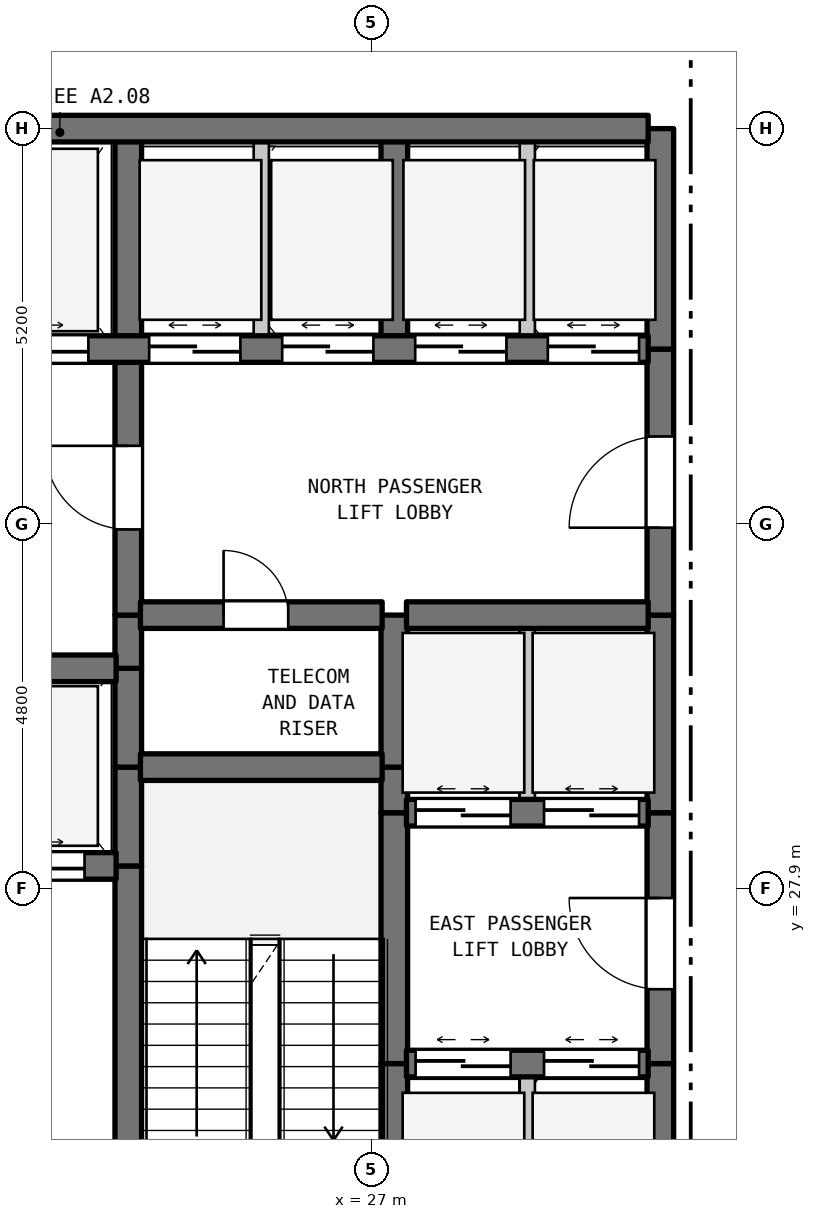
"""IFC4 building model, lengths in metres.
Left out: names, types, materials, properties, quantities, classifications, styles, units other than length and angle.
Written with IfcOpenShell. Run it as: python <this file> out.ifc"""

import sys

from ifc_helpers import new_model, si_unit, direction, frame, frame_2d, origin, place, context, subcontext, project, spatial, rectangle, extrude, element, fill, save


model = new_model("IFC4")
c1 = context("Model", 3, precision=1e-05, world=origin(), true_north=direction((0.0, 1.0)))
c2 = subcontext(c1, "Body", "Model", "MODEL_VIEW")
j1 = project(units=[si_unit("LENGTHUNIT", "METRE"), si_unit("PLANEANGLEUNIT", "RADIAN")], contexts=[c1])
p1 = place(None, origin())
s1 = spatial("IfcSite", under=j1, at=p1, CompositionType="ELEMENT")
p2 = place(p1, origin())
s2 = spatial("IfcBuilding", under=s1, at=p2, CompositionType="ELEMENT")
p3 = place(p2, frame((0.0, 0.0, 42.5)))
s3 = spatial("IfcBuildingStorey", under=s2, at=p3, CompositionType="ELEMENT", Elevation=42.5)
p4 = place(p3, frame((23.8, 22.7, 0.0), z_axis=(0.0, 0.0, 1.0), x_axis=(0.0, 1.0, 0.0)))
e1 = element("IfcWall", 1, at=p4, inside=s3, PredefinedType="SHEAR", context=c2, shape_type="SweptSolid", body=[
    extrude(rectangle(XDim=5.5, YDim=0.35, at=frame_2d((2.75, 0.0))), origin(), (0.0, 0.0, 1.0), 3.385),
])
p5 = place(p4, frame((0.235, 0.0, 0.0)))
e2 = element("IfcOpeningElement", 2, at=p5, cuts=e1, PredefinedType="OPENING", context=c2, shape_type="SweptSolid", body=[
    extrude(rectangle(XDim=1.1, YDim=2.15, at=frame_2d((0.55, 1.075))), frame((0.0, 0.185, 0.0), z_axis=(0.0, -1.0, 0.0), x_axis=(1.0, 0.0, 0.0)), (0.0, 0.0, 1.0), 0.37),
])
for number, where, z_axis, x_axis in (
    (3, (23.8, 28.2, 0.0), (0.0, 0.0, 1.0), (0.0, 1.0, 0.0)),
    (4, (23.8, 29.5, 0.0), (0.0, 0.0, 1.0), (0.0, 1.0, 0.0)),
):
    element("IfcWall", number, at=place(p3, frame(where, z_axis=z_axis, x_axis=x_axis)), inside=s3, PredefinedType="SHEAR", context=c2, shape_type="SweptSolid", body=[
        extrude(rectangle(XDim=1.3, YDim=0.35, at=frame_2d((0.65, 0.0))), origin(), (0.0, 0.0, 1.0), 3.385),
    ])
p6 = place(p3, frame((23.8, 30.8, 0.0), z_axis=(0.0, 0.0, 1.0), x_axis=(0.0, 1.0, 0.0)))
e5 = element("IfcWall", 5, at=p6, inside=s3, PredefinedType="SHEAR", context=c2, shape_type="SweptSolid", body=[
    extrude(rectangle(XDim=0.7, YDim=0.35, at=frame_2d((0.35, 0.0))), origin(), (0.0, 0.0, 1.0), 3.385),
])
p7 = place(p3, frame((23.8, 31.5, 0.0), z_axis=(0.0, 0.0, 1.0), x_axis=(0.0, 1.0, 0.0)))
e6 = element("IfcWall", 6, at=p7, inside=s3, PredefinedType="SHEAR", context=c2, shape_type="SweptSolid", body=[
    extrude(rectangle(XDim=3.5, YDim=0.35, at=frame_2d((1.75, 0.0))), origin(), (0.0, 0.0, 1.0), 3.385),
])
p8 = place(p7, frame((1.127, 0.0, 0.0)))
e7 = element("IfcOpeningElement", 7, at=p8, cuts=e6, PredefinedType="OPENING", context=c2, shape_type="SweptSolid", body=[
    extrude(rectangle(XDim=1.1, YDim=2.15, at=frame_2d((0.55, 1.075))), frame((0.0, 0.185, 0.0), z_axis=(0.0, -1.0, 0.0), x_axis=(1.0, 0.0, 0.0)), (0.0, 0.0, 1.0), 0.37),
])
p9 = place(p3, frame((23.8, 35.0, 0.0), z_axis=(0.0, 0.0, 1.0), x_axis=(0.0, 1.0, 0.0)))
e8 = element("IfcWall", 8, at=p9, inside=s3, PredefinedType="SHEAR", context=c2, shape_type="SweptSolid", body=[
    extrude(rectangle(XDim=2.9, YDim=0.35, at=frame_2d((1.45, 0.0))), origin(), (0.0, 0.0, 1.0), 3.385),
])
p10 = place(p3, frame((25.55, 35.0, 0.0), z_axis=(0.0, 0.0, 1.0), x_axis=(0.0, 1.0, 0.0)))
e9 = element("IfcWall", 9, at=p10, inside=s3, PredefinedType="STANDARD", context=c2, shape_type="SweptSolid", body=[
    extrude(rectangle(XDim=2.9, YDim=0.2, at=frame_2d((1.45, 0.0))), origin(), (0.0, 0.0, 1.0), 3.385),
])
p11 = place(p3, frame((27.3, 22.7, 0.0), z_axis=(0.0, 0.0, 1.0), x_axis=(0.0, 1.0, 0.0)))
e10 = element("IfcWall", 10, at=p11, inside=s3, PredefinedType="SHEAR", context=c2, shape_type="SweptSolid", body=[
    extrude(rectangle(XDim=2.9, YDim=0.35, at=frame_2d((1.45, 0.0))), origin(), (0.0, 0.0, 1.0), 3.385),
])
p12 = place(p3, frame((27.3, 25.6, 0.0), z_axis=(0.0, 0.0, 1.0), x_axis=(0.0, 1.0, 0.0)))
e11 = element("IfcWall", 11, at=p12, inside=s3, PredefinedType="SHEAR", context=c2, shape_type="SweptSolid", body=[
    extrude(rectangle(XDim=3.3, YDim=0.35, at=frame_2d((1.65, 0.0))), origin(), (0.0, 0.0, 1.0), 3.385),
])
p13 = place(p3, frame((27.3, 28.9, 0.0), z_axis=(0.0, 0.0, 1.0), x_axis=(0.0, 1.0, 0.0)))
e12 = element("IfcWall", 12, at=p13, inside=s3, PredefinedType="SHEAR", context=c2, shape_type="SweptSolid", body=[
    extrude(rectangle(XDim=0.6, YDim=0.35, at=frame_2d((0.3, 0.0))), origin(), (0.0, 0.0, 1.0), 3.385),
])
p14 = place(p3, frame((27.3, 29.5, 0.0), z_axis=(0.0, 0.0, 1.0), x_axis=(0.0, 1.0, 0.0)))
e13 = element("IfcWall", 13, at=p14, inside=s3, PredefinedType="SHEAR", context=c2, shape_type="SweptSolid", body=[
    extrude(rectangle(XDim=2.0, YDim=0.35, at=frame_2d((1.0, 0.0))), origin(), (0.0, 0.0, 1.0), 3.385),
])
p15 = place(p3, frame((27.3, 35.0, 0.0), z_axis=(0.0, 0.0, 1.0), x_axis=(0.0, 1.0, 0.0)))
e14 = element("IfcWall", 14, at=p15, inside=s3, PredefinedType="SHEAR", context=c2, shape_type="SweptSolid", body=[
    extrude(rectangle(XDim=2.9, YDim=0.35, at=frame_2d((1.45, 0.0))), origin(), (0.0, 0.0, 1.0), 3.385),
])
p16 = place(p3, frame((29.05, 22.7, 0.0), z_axis=(0.0, 0.0, 1.0), x_axis=(0.0, 1.0, 0.0)))
e15 = element("IfcWall", 15, at=p16, inside=s3, PredefinedType="STANDARD", context=c2, shape_type="SweptSolid", body=[
    extrude(rectangle(XDim=2.9, YDim=0.2, at=frame_2d((1.45, 0.0))), origin(), (0.0, 0.0, 1.0), 3.385),
])
p17 = place(p3, frame((29.05, 28.9, 0.0), z_axis=(0.0, 0.0, 1.0), x_axis=(0.0, 1.0, 0.0)))
e16 = element("IfcWall", 16, at=p17, inside=s3, PredefinedType="STANDARD", context=c2, shape_type="SweptSolid", body=[
    extrude(rectangle(XDim=2.6, YDim=0.2, at=frame_2d((1.3, 0.0))), origin(), (0.0, 0.0, 1.0), 3.385),
])
p18 = place(p3, frame((29.05, 35.0, 0.0), z_axis=(0.0, 0.0, 1.0), x_axis=(0.0, 1.0, 0.0)))
e17 = element("IfcWall", 17, at=p18, inside=s3, PredefinedType="STANDARD", context=c2, shape_type="SweptSolid", body=[
    extrude(rectangle(XDim=2.9, YDim=0.2, at=frame_2d((1.45, 0.0))), origin(), (0.0, 0.0, 1.0), 3.385),
])
p19 = place(p3, frame((30.8, 22.7, 0.0), z_axis=(0.0, 0.0, 1.0), x_axis=(0.0, 1.0, 0.0)))
e18 = element("IfcWall", 18, at=p19, inside=s3, PredefinedType="SHEAR", context=c2, shape_type="SweptSolid", body=[
    extrude(rectangle(XDim=2.9, YDim=0.35, at=frame_2d((1.45, 0.0))), origin(), (0.0, 0.0, 1.0), 3.385),
])
p20 = place(p3, frame((30.8, 25.6, 0.0), z_axis=(0.0, 0.0, 1.0), x_axis=(0.0, 1.0, 0.0)))
e19 = element("IfcWall", 19, at=p20, inside=s3, PredefinedType="SHEAR", context=c2, shape_type="SweptSolid", body=[
    extrude(rectangle(XDim=3.3, YDim=0.35, at=frame_2d((1.65, 0.0))), origin(), (0.0, 0.0, 1.0), 3.385),
])
p21 = place(p20, frame((0.978, 0.0, 0.0)))
e20 = element("IfcOpeningElement", 20, at=p21, cuts=e19, PredefinedType="OPENING", context=c2, shape_type="SweptSolid", body=[
    extrude(rectangle(XDim=1.2, YDim=2.2, at=frame_2d((0.6, 1.1))), frame((0.0, 0.185, 0.0), z_axis=(0.0, -1.0, 0.0), x_axis=(1.0, 0.0, 0.0)), (0.0, 0.0, 1.0), 0.37),
])
p22 = place(p3, frame((30.8, 28.9, 0.0), z_axis=(0.0, 0.0, 1.0), x_axis=(0.0, 1.0, 0.0)))
e21 = element("IfcWall", 21, at=p22, inside=s3, PredefinedType="SHEAR", context=c2, shape_type="SweptSolid", body=[
    extrude(rectangle(XDim=2.6, YDim=0.35, at=frame_2d((1.3, 0.0))), origin(), (0.0, 0.0, 1.0), 3.385),
])
p23 = place(p3, frame((30.8, 31.5, 0.0), z_axis=(0.0, 0.0, 1.0), x_axis=(0.0, 1.0, 0.0)))
e22 = element("IfcWall", 22, at=p23, inside=s3, PredefinedType="SHEAR", context=c2, shape_type="SweptSolid", body=[
    extrude(rectangle(XDim=3.5, YDim=0.35, at=frame_2d((1.75, 0.0))), origin(), (0.0, 0.0, 1.0), 3.385),
])
p24 = place(p23, frame((1.15, 0.0, 0.0)))
e23 = element("IfcOpeningElement", 23, at=p24, cuts=e22, PredefinedType="OPENING", context=c2, shape_type="SweptSolid", body=[
    extrude(rectangle(XDim=1.2, YDim=2.2, at=frame_2d((0.6, 1.1))), frame((0.0, 0.185, 0.0), z_axis=(0.0, -1.0, 0.0), x_axis=(1.0, 0.0, 0.0)), (0.0, 0.0, 1.0), 0.37),
])
p25 = place(p3, frame((30.8, 35.0, 0.0), z_axis=(0.0, 0.0, 1.0), x_axis=(0.0, 1.0, 0.0)))
e24 = element("IfcWall", 24, at=p25, inside=s3, PredefinedType="SHEAR", context=c2, shape_type="SweptSolid", body=[
    extrude(rectangle(XDim=2.9, YDim=0.35, at=frame_2d((1.45, 0.0))), origin(), (0.0, 0.0, 1.0), 3.385),
])
p26 = place(p3, frame((27.46, 25.6, 0.0), z_axis=(0.0, 0.0, 1.0), x_axis=(1.0, 0.0, 0.0)))
e25 = element("IfcWall", 25, at=p26, inside=s3, PredefinedType="SHEAR", context=c2, shape_type="SweptSolid", body=[
    extrude(rectangle(XDim=3.18, YDim=0.35, at=frame_2d((1.59, 0.0))), origin(), (0.0, 0.0, 1.0), 3.385),
])
p27 = place(p26, frame((0.12, 0.0, 0.0)))
e26 = element("IfcOpeningElement", 26, at=p27, cuts=e25, PredefinedType="OPENING", context=c2, shape_type="SweptSolid", body=[
    extrude(rectangle(XDim=1.25, YDim=2.2, at=frame_2d((0.625, 1.1))), frame((0.0, 0.185, 0.0), z_axis=(0.0, -1.0, 0.0), x_axis=(1.0, 0.0, 0.0)), (0.0, 0.0, 1.0), 0.37),
])
p28 = place(p26, frame((1.81, 0.0, 0.0)))
e27 = element("IfcOpeningElement", 27, at=p28, cuts=e25, PredefinedType="OPENING", context=c2, shape_type="SweptSolid", body=[
    extrude(rectangle(XDim=1.25, YDim=2.2, at=frame_2d((0.625, 1.1))), frame((0.0, 0.185, 0.0), z_axis=(0.0, -1.0, 0.0), x_axis=(1.0, 0.0, 0.0)), (0.0, 0.0, 1.0), 0.37),
])
p29 = place(p3, frame((19.16, 28.2, 0.0), z_axis=(0.0, 0.0, 1.0), x_axis=(1.0, 0.0, 0.0)))
e28 = element("IfcWall", 28, at=p29, inside=s3, PredefinedType="SHEAR", context=c2, shape_type="SweptSolid", body=[
    extrude(rectangle(XDim=4.48, YDim=0.35, at=frame_2d((2.24, 0.0))), origin(), (0.0, 0.0, 1.0), 3.385),
])
p30 = place(p29, frame((0.415, 0.0, 0.0)))
e29 = element("IfcOpeningElement", 29, at=p30, cuts=e28, PredefinedType="OPENING", context=c2, shape_type="SweptSolid", body=[
    extrude(rectangle(XDim=1.25, YDim=2.2, at=frame_2d((0.625, 1.1))), frame((0.0, 0.185, 0.0), z_axis=(0.0, -1.0, 0.0), x_axis=(1.0, 0.0, 0.0)), (0.0, 0.0, 1.0), 0.37),
])
p31 = place(p29, frame((2.815, 0.0, 0.0)))
e30 = element("IfcOpeningElement", 30, at=p31, cuts=e28, PredefinedType="OPENING", context=c2, shape_type="SweptSolid", body=[
    extrude(rectangle(XDim=1.25, YDim=2.2, at=frame_2d((0.625, 1.1))), frame((0.0, 0.185, 0.0), z_axis=(0.0, -1.0, 0.0), x_axis=(1.0, 0.0, 0.0)), (0.0, 0.0, 1.0), 0.37),
])
p32 = place(p3, frame((27.46, 28.9, 0.0), z_axis=(0.0, 0.0, 1.0), x_axis=(1.0, 0.0, 0.0)))
e31 = element("IfcWall", 31, at=p32, inside=s3, PredefinedType="SHEAR", context=c2, shape_type="SweptSolid", body=[
    extrude(rectangle(XDim=3.18, YDim=0.35, at=frame_2d((1.59, 0.0))), origin(), (0.0, 0.0, 1.0), 3.385),
])
p33 = place(p32, frame((0.12, 0.0, 0.0)))
e32 = element("IfcOpeningElement", 32, at=p33, cuts=e31, PredefinedType="OPENING", context=c2, shape_type="SweptSolid", body=[
    extrude(rectangle(XDim=1.25, YDim=2.2, at=frame_2d((0.625, 1.1))), frame((0.0, 0.185, 0.0), z_axis=(0.0, -1.0, 0.0), x_axis=(1.0, 0.0, 0.0)), (0.0, 0.0, 1.0), 0.37),
])
p34 = place(p32, frame((1.81, 0.0, 0.0)))
e33 = element("IfcOpeningElement", 33, at=p34, cuts=e31, PredefinedType="OPENING", context=c2, shape_type="SweptSolid", body=[
    extrude(rectangle(XDim=1.25, YDim=2.2, at=frame_2d((0.625, 1.1))), frame((0.0, 0.185, 0.0), z_axis=(0.0, -1.0, 0.0), x_axis=(1.0, 0.0, 0.0)), (0.0, 0.0, 1.0), 0.37),
])
p35 = place(p3, frame((23.96, 29.5, 0.0), z_axis=(0.0, 0.0, 1.0), x_axis=(1.0, 0.0, 0.0)))
e34 = element("IfcWall", 34, at=p35, inside=s3, PredefinedType="SHEAR", context=c2, shape_type="SweptSolid", body=[
    extrude(rectangle(XDim=3.18, YDim=0.35, at=frame_2d((1.59, 0.0))), origin(), (0.0, 0.0, 1.0), 3.385),
])
p36 = place(p3, frame((19.16, 30.8, 0.0), z_axis=(0.0, 0.0, 1.0), x_axis=(1.0, 0.0, 0.0)))
e35 = element("IfcWall", 35, at=p36, inside=s3, PredefinedType="SHEAR", context=c2, shape_type="SweptSolid", body=[
    extrude(rectangle(XDim=4.48, YDim=0.35, at=frame_2d((2.24, 0.0))), origin(), (0.0, 0.0, 1.0), 3.385),
])
p37 = place(p3, frame((23.96, 31.5, 0.0), z_axis=(0.0, 0.0, 1.0), x_axis=(1.0, 0.0, 0.0)))
e36 = element("IfcWall", 36, at=p37, inside=s3, PredefinedType="SHEAR", context=c2, shape_type="SweptSolid", body=[
    extrude(rectangle(XDim=3.18, YDim=0.35, at=frame_2d((1.59, 0.0))), origin(), (0.0, 0.0, 1.0), 3.385),
])
p38 = place(p37, frame((1.094, 0.0, 0.0)))
e37 = element("IfcOpeningElement", 37, at=p38, cuts=e36, PredefinedType="OPENING", context=c2, shape_type="SweptSolid", body=[
    extrude(rectangle(XDim=0.85, YDim=2.1, at=frame_2d((0.425, 1.05))), frame((0.0, 0.185, 0.0), z_axis=(0.0, -1.0, 0.0), x_axis=(1.0, 0.0, 0.0)), (0.0, 0.0, 1.0), 0.37),
])
p39 = place(p3, frame((27.46, 31.5, 0.0), z_axis=(0.0, 0.0, 1.0), x_axis=(1.0, 0.0, 0.0)))
e38 = element("IfcWall", 38, at=p39, inside=s3, PredefinedType="SHEAR", context=c2, shape_type="SweptSolid", body=[
    extrude(rectangle(XDim=3.18, YDim=0.35, at=frame_2d((1.59, 0.0))), origin(), (0.0, 0.0, 1.0), 3.385),
])
p40 = place(p3, frame((19.16, 35.0, 0.0), z_axis=(0.0, 0.0, 1.0), x_axis=(1.0, 0.0, 0.0)))
e39 = element("IfcWall", 39, at=p40, inside=s3, PredefinedType="SHEAR", context=c2, shape_type="SweptSolid", body=[
    extrude(rectangle(XDim=11.48, YDim=0.35, at=frame_2d((5.74, 0.0))), origin(), (0.0, 0.0, 1.0), 3.385),
])
p41 = place(p40, frame((0.365, 0.0, 0.0)))
e40 = element("IfcOpeningElement", 40, at=p41, cuts=e39, PredefinedType="OPENING", context=c2, shape_type="SweptSolid", body=[
    extrude(rectangle(XDim=1.35, YDim=2.2, at=frame_2d((0.675, 1.1))), frame((0.0, 0.185, 0.0), z_axis=(0.0, -1.0, 0.0), x_axis=(1.0, 0.0, 0.0)), (0.0, 0.0, 1.0), 0.37),
])
p42 = place(p40, frame((2.765, 0.0, 0.0)))
e41 = element("IfcOpeningElement", 41, at=p42, cuts=e39, PredefinedType="OPENING", context=c2, shape_type="SweptSolid", body=[
    extrude(rectangle(XDim=1.35, YDim=2.2, at=frame_2d((0.675, 1.1))), frame((0.0, 0.185, 0.0), z_axis=(0.0, -1.0, 0.0), x_axis=(1.0, 0.0, 0.0)), (0.0, 0.0, 1.0), 0.37),
])
p43 = place(p40, frame((4.915, 0.0, 0.0)))
e42 = element("IfcOpeningElement", 42, at=p43, cuts=e39, PredefinedType="OPENING", context=c2, shape_type="SweptSolid", body=[
    extrude(rectangle(XDim=1.2, YDim=2.2, at=frame_2d((0.6, 1.1))), frame((0.0, 0.185, 0.0), z_axis=(0.0, -1.0, 0.0), x_axis=(1.0, 0.0, 0.0)), (0.0, 0.0, 1.0), 0.37),
])
p44 = place(p40, frame((6.665, 0.0, 0.0)))
e43 = element("IfcOpeningElement", 43, at=p44, cuts=e39, PredefinedType="OPENING", context=c2, shape_type="SweptSolid", body=[
    extrude(rectangle(XDim=1.2, YDim=2.2, at=frame_2d((0.6, 1.1))), frame((0.0, 0.185, 0.0), z_axis=(0.0, -1.0, 0.0), x_axis=(1.0, 0.0, 0.0)), (0.0, 0.0, 1.0), 0.37),
])
p45 = place(p40, frame((8.415, 0.0, 0.0)))
e44 = element("IfcOpeningElement", 44, at=p45, cuts=e39, PredefinedType="OPENING", context=c2, shape_type="SweptSolid", body=[
    extrude(rectangle(XDim=1.2, YDim=2.2, at=frame_2d((0.6, 1.1))), frame((0.0, 0.185, 0.0), z_axis=(0.0, -1.0, 0.0), x_axis=(1.0, 0.0, 0.0)), (0.0, 0.0, 1.0), 0.37),
])
p46 = place(p40, frame((10.16, 0.0, 0.0)))
e45 = element("IfcOpeningElement", 45, at=p46, cuts=e39, PredefinedType="OPENING", context=c2, shape_type="SweptSolid", body=[
    extrude(rectangle(XDim=1.2, YDim=2.2, at=frame_2d((0.6, 1.1))), frame((0.0, 0.185, 0.0), z_axis=(0.0, -1.0, 0.0), x_axis=(1.0, 0.0, 0.0)), (0.0, 0.0, 1.0), 0.37),
])
p47 = place(p3, frame((19.16, 37.9, 0.0), z_axis=(0.0, 0.0, 1.0), x_axis=(1.0, 0.0, 0.0)))
e46 = element("IfcWall", 46, at=p47, inside=s3, PredefinedType="SHEAR", context=c2, shape_type="SweptSolid", body=[
    extrude(rectangle(XDim=11.48, YDim=0.35, at=frame_2d((5.74, 0.0))), origin(), (0.0, 0.0, 1.0), 3.385),
])
p48 = place(p8, origin())
e47 = element("IfcDoor", 47, at=p48, inside=s3, OperationType="SINGLE_SWING_RIGHT", PredefinedType="DOOR", context=c2, shape_type="SweptSolid", body=[
    extrude(rectangle(XDim=1.1, YDim=2.15, at=frame_2d((0.55, 1.075))), frame((0.0, 0.025, 0.0), z_axis=(0.0, -1.0, 0.0), x_axis=(1.0, 0.0, 0.0)), (0.0, 0.0, 1.0), 0.05),
])
fill(e7, e47)
p49 = place(p21, origin())
e48 = element("IfcDoor", 48, at=p49, inside=s3, OperationType="SINGLE_SWING_RIGHT", PredefinedType="DOOR", context=c2, shape_type="SweptSolid", body=[
    extrude(rectangle(XDim=1.2, YDim=2.2, at=frame_2d((0.6, 1.1))), frame((0.0, 0.025, 0.0), z_axis=(0.0, -1.0, 0.0), x_axis=(1.0, 0.0, 0.0)), (0.0, 0.0, 1.0), 0.05),
])
fill(e20, e48)
p50 = place(p24, origin())
e49 = element("IfcDoor", 49, at=p50, inside=s3, OperationType="SINGLE_SWING_LEFT", PredefinedType="DOOR", context=c2, shape_type="SweptSolid", body=[
    extrude(rectangle(XDim=1.2, YDim=2.2, at=frame_2d((0.6, 1.1))), frame((0.0, 0.025, 0.0), z_axis=(0.0, -1.0, 0.0), x_axis=(1.0, 0.0, 0.0)), (0.0, 0.0, 1.0), 0.05),
])
fill(e23, e49)
p51 = place(p27, origin())
e50 = element("IfcDoor", 50, at=p51, inside=s3, OperationType="DOUBLE_DOOR_SLIDING", PredefinedType="DOOR", context=c2, shape_type="SweptSolid", body=[
    extrude(rectangle(XDim=1.25, YDim=2.2, at=frame_2d((0.625, 1.1))), frame((0.0, 0.025, 0.0), z_axis=(0.0, -1.0, 0.0), x_axis=(1.0, 0.0, 0.0)), (0.0, 0.0, 1.0), 0.05),
])
fill(e26, e50)
p52 = place(p28, origin())
e51 = element("IfcDoor", 51, at=p52, inside=s3, OperationType="DOUBLE_DOOR_SLIDING", PredefinedType="DOOR", context=c2, shape_type="SweptSolid", body=[
    extrude(rectangle(XDim=1.25, YDim=2.2, at=frame_2d((0.625, 1.1))), frame((0.0, 0.025, 0.0), z_axis=(0.0, -1.0, 0.0), x_axis=(1.0, 0.0, 0.0)), (0.0, 0.0, 1.0), 0.05),
])
fill(e27, e51)
p53 = place(p31, origin())
e52 = element("IfcDoor", 52, at=p53, inside=s3, OperationType="DOUBLE_DOOR_SLIDING", PredefinedType="DOOR", context=c2, shape_type="SweptSolid", body=[
    extrude(rectangle(XDim=1.25, YDim=2.2, at=frame_2d((0.625, 1.1))), frame((0.0, 0.025, 0.0), z_axis=(0.0, -1.0, 0.0), x_axis=(1.0, 0.0, 0.0)), (0.0, 0.0, 1.0), 0.05),
])
fill(e30, e52)
p54 = place(p33, origin())
e53 = element("IfcDoor", 53, at=p54, inside=s3, OperationType="DOUBLE_DOOR_SLIDING", PredefinedType="DOOR", context=c2, shape_type="SweptSolid", body=[
    extrude(rectangle(XDim=1.25, YDim=2.2, at=frame_2d((0.625, 1.1))), frame((0.0, 0.025, 0.0), z_axis=(0.0, -1.0, 0.0), x_axis=(1.0, 0.0, 0.0)), (0.0, 0.0, 1.0), 0.05),
])
fill(e32, e53)
p55 = place(p34, origin())
e54 = element("IfcDoor", 54, at=p55, inside=s3, OperationType="DOUBLE_DOOR_SLIDING", PredefinedType="DOOR", context=c2, shape_type="SweptSolid", body=[
    extrude(rectangle(XDim=1.25, YDim=2.2, at=frame_2d((0.625, 1.1))), frame((0.0, 0.025, 0.0), z_axis=(0.0, -1.0, 0.0), x_axis=(1.0, 0.0, 0.0)), (0.0, 0.0, 1.0), 0.05),
])
fill(e33, e54)
p56 = place(p38, origin())
e55 = element("IfcDoor", 55, at=p56, inside=s3, OperationType="SINGLE_SWING_LEFT", PredefinedType="DOOR", context=c2, shape_type="SweptSolid", body=[
    extrude(rectangle(XDim=0.85, YDim=2.1, at=frame_2d((0.425, 1.05))), frame((0.0, 0.025, 0.0), z_axis=(0.0, -1.0, 0.0), x_axis=(1.0, 0.0, 0.0)), (0.0, 0.0, 1.0), 0.05),
])
fill(e37, e55)
p57 = place(p42, origin())
e56 = element("IfcDoor", 56, at=p57, inside=s3, OperationType="DOUBLE_DOOR_SLIDING", PredefinedType="DOOR", context=c2, shape_type="SweptSolid", body=[
    extrude(rectangle(XDim=1.35, YDim=2.2, at=frame_2d((0.675, 1.1))), frame((0.0, 0.025, 0.0), z_axis=(0.0, -1.0, 0.0), x_axis=(1.0, 0.0, 0.0)), (0.0, 0.0, 1.0), 0.05),
])
fill(e41, e56)
p58 = place(p43, origin())
e57 = element("IfcDoor", 57, at=p58, inside=s3, OperationType="DOUBLE_DOOR_SLIDING", PredefinedType="DOOR", context=c2, shape_type="SweptSolid", body=[
    extrude(rectangle(XDim=1.2, YDim=2.2, at=frame_2d((0.6, 1.1))), frame((0.0, 0.025, 0.0), z_axis=(0.0, -1.0, 0.0), x_axis=(1.0, 0.0, 0.0)), (0.0, 0.0, 1.0), 0.05),
])
fill(e42, e57)
p59 = place(p44, origin())
e58 = element("IfcDoor", 58, at=p59, inside=s3, OperationType="DOUBLE_DOOR_SLIDING", PredefinedType="DOOR", context=c2, shape_type="SweptSolid", body=[
    extrude(rectangle(XDim=1.2, YDim=2.2, at=frame_2d((0.6, 1.1))), frame((0.0, 0.025, 0.0), z_axis=(0.0, -1.0, 0.0), x_axis=(1.0, 0.0, 0.0)), (0.0, 0.0, 1.0), 0.05),
])
fill(e43, e58)
p60 = place(p45, origin())
e59 = element("IfcDoor", 59, at=p60, inside=s3, OperationType="DOUBLE_DOOR_SLIDING", PredefinedType="DOOR", context=c2, shape_type="SweptSolid", body=[
    extrude(rectangle(XDim=1.2, YDim=2.2, at=frame_2d((0.6, 1.1))), frame((0.0, 0.025, 0.0), z_axis=(0.0, -1.0, 0.0), x_axis=(1.0, 0.0, 0.0)), (0.0, 0.0, 1.0), 0.05),
])
fill(e44, e59)
p61 = place(p46, origin())
e60 = element("IfcDoor", 60, at=p61, inside=s3, OperationType="DOUBLE_DOOR_SLIDING", PredefinedType="DOOR", context=c2, shape_type="SweptSolid", body=[
    extrude(rectangle(XDim=1.2, YDim=2.2, at=frame_2d((0.6, 1.1))), frame((0.0, 0.025, 0.0), z_axis=(0.0, -1.0, 0.0), x_axis=(1.0, 0.0, 0.0)), (0.0, 0.0, 1.0), 0.05),
])
fill(e45, e60)
save(model, sys.argv[1])
